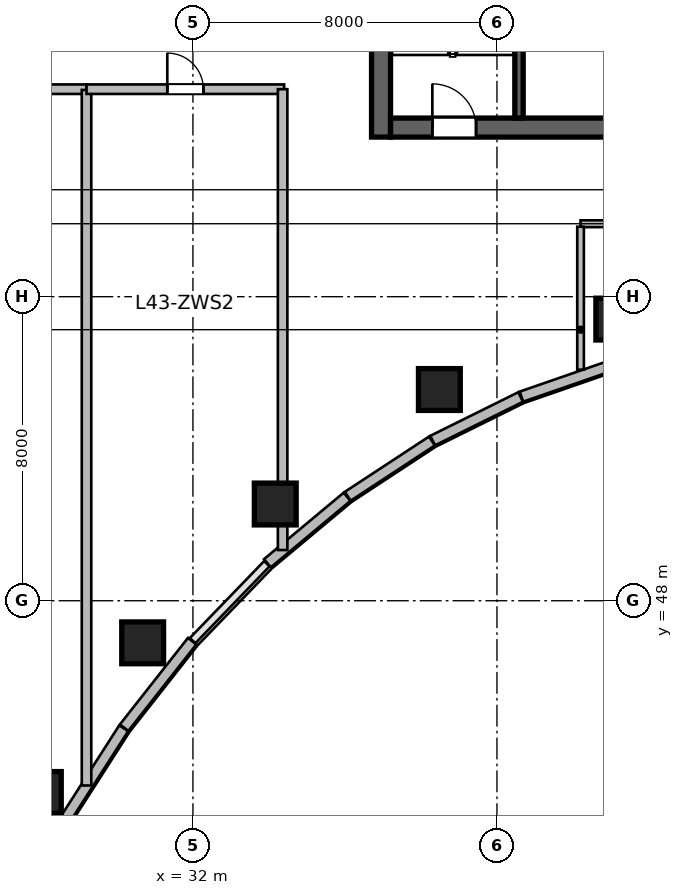
"""IFC4 building model, lengths in metres.
Left out: names, types, materials, properties, quantities, classifications, styles, units other than length and angle.
Written with IfcOpenShell. Run it as: python <this file> out.ifc"""

import sys

from ifc_helpers import new_model, si_unit, direction, frame, frame_2d, origin, origin_2d, place, context, subcontext, project, spatial, rectangle, circle, extrude, source, transform, mapped, element, fill, save


model = new_model("IFC4")
c1 = context("Model", 3, precision=1e-05, world=origin(), true_north=direction((0.0, 1.0)))
c2 = subcontext(c1, "Body", "Model", "MODEL_VIEW")
j1 = project(units=[si_unit("LENGTHUNIT", "METRE"), si_unit("PLANEANGLEUNIT", "RADIAN")], contexts=[c1])
p1 = place(None, origin())
s1 = spatial("IfcSite", under=j1, at=p1, CompositionType="ELEMENT")
p2 = place(p1, origin())
s2 = spatial("IfcBuilding", under=s1, at=p2, CompositionType="ELEMENT")
p3 = place(p2, frame((0.0, 0.0, 177.9)))
s3 = spatial("IfcBuildingStorey", under=s2, at=p3, CompositionType="ELEMENT", Elevation=177.9)
m1 = source(origin(), c2, "Body", "SweptSolid", [
    extrude(rectangle(XDim=12.0, YDim=0.5, at=frame_2d((6.0, 0.0))), origin(), (0.0, 0.0, 1.0), 3.9),
])
p4 = place(p3, frame((36.95, 60.2, 0.0), z_axis=(0.0, 0.0, 1.0), x_axis=(0.0, 1.0, 0.0)))
e1 = element("IfcWall", 1, at=p4, inside=s3, PredefinedType="SHEAR", context=c2, shape_type="MappedRepresentation", body=[
    mapped(m1, transform((0.0, 0.0, 0.0), scale=1.0)),
])
m2 = source(origin(), c2, "Body", "SweptSolid", [
    extrude(rectangle(XDim=21.6, YDim=0.5, at=frame_2d((10.8, 0.0))), origin(), (0.0, 0.0, 1.0), 3.9),
])
p5 = place(p3, frame((37.2, 60.45, 0.0), z_axis=(0.0, 0.0, 1.0), x_axis=(1.0, 0.0, 0.0)))
e2 = element("IfcWall", 2, at=p5, inside=s3, PredefinedType="SHEAR", context=c2, shape_type="MappedRepresentation", body=[
    mapped(m2, transform((0.0, 0.0, 0.0), scale=1.0)),
])
p6 = place(p5, frame((1.1, 0.0, 0.0)))
e3 = element("IfcOpeningElement", 3, at=p6, cuts=e2, PredefinedType="OPENING", context=c2, shape_type="SweptSolid", body=[
    extrude(rectangle(XDim=1.15, YDim=2.15, at=frame_2d((0.575, 1.075))), frame((0.0, 0.26, 0.0), z_axis=(0.0, -1.0, 0.0), x_axis=(1.0, 0.0, 0.0)), (0.0, 0.0, 1.0), 0.52),
])
p7 = place(p5, frame((19.5, 0.0, 0.0)))
e4 = element("IfcOpeningElement", 4, at=p7, cuts=e2, PredefinedType="OPENING", context=c2, shape_type="SweptSolid", body=[
    extrude(rectangle(XDim=0.9, YDim=2.1, at=frame_2d((0.45, 1.05))), frame((0.0, 0.26, 0.0), z_axis=(0.0, -1.0, 0.0), x_axis=(1.0, 0.0, 0.0)), (0.0, 0.0, 1.0), 0.52),
])
p8 = place(p5, frame((12.02, 0.0, 0.0)))
e5 = element("IfcOpeningElement", 5, at=p8, cuts=e2, PredefinedType="OPENING", context=c2, shape_type="SweptSolid", body=[
    extrude(rectangle(XDim=1.6, YDim=2.15, at=frame_2d((0.8, 1.075))), frame((0.0, 0.26, 0.0), z_axis=(0.0, -1.0, 0.0), x_axis=(1.0, 0.0, 0.0)), (0.0, 0.0, 1.0), 0.52),
])
m3 = source(origin(), c2, "Body", "SweptSolid", [
    extrude(rectangle(XDim=11.0, YDim=0.22, at=frame_2d((5.5, 0.0))), origin(), (0.0, 0.0, 1.0), 3.9),
])
p9 = place(p3, frame((40.58, 60.7, 0.0), z_axis=(0.0, 0.0, 1.0), x_axis=(0.0, 1.0, 0.0)))
e6 = element("IfcWall", 6, at=p9, inside=s3, PredefinedType="SHEAR", context=c2, shape_type="MappedRepresentation", body=[
    mapped(m3, transform((0.0, 0.0, 0.0), scale=1.0)),
])
m4 = source(origin(), c2, "Body", "SweptSolid", [
    extrude(circle(Radius=0.55, at=origin_2d()), origin(), (0.0, 0.0, 1.0), 3.9),
])
for number, where, z_axis, x_axis in (
    (7, (27.985, 42.955, 0.0), (0.0, 0.0, 1.0), (-0.691, 0.723, 0.0)),
    (8, (30.677, 46.892, 0.0), (0.0, 0.0, 1.0), (-0.571, 0.821, 0.0)),
    (9, (34.166, 50.545, 0.0), (0.0, 0.0, 1.0), (-0.436, 0.9, 0.0)),
    (10, (38.485, 53.558, 0.0), (0.0, 0.0, 1.0), (-0.289, 0.957, 0.0)),
    (11, (43.154, 55.411, 0.0), (0.0, 0.0, 1.0), (-0.143, 0.99, 0.0)),
):
    element("IfcColumn", number, at=place(p3, frame(where, z_axis=z_axis, x_axis=x_axis)), inside=s3, PredefinedType="COLUMN", context=c2, shape_type="MappedRepresentation", body=[
        mapped(m4, transform((0.0, 0.0, 0.0), scale=1.0)),
    ])
m5 = source(origin(), c2, "Body", "SweptSolid", [
    extrude(rectangle(XDim=2.53, YDim=0.28, at=frame_2d((1.265, 0.0))), origin(), (0.0, 0.0, 1.0), 3.65),
])
p10 = place(p3, frame((43.035, 54.198, 0.0), z_axis=(0.0, 0.0, 1.0), x_axis=(-0.944872429646, -0.327438683872, 0.0)))
e12 = element("IfcWall", 12, at=p10, inside=s3, PredefinedType="SOLIDWALL", context=c2, shape_type="MappedRepresentation", body=[
    mapped(m5, transform((0.0, 0.0, 0.0), scale=1.0)),
])
m6 = source(origin(), c2, "Body", "SweptSolid", [
    extrude(rectangle(XDim=2.584, YDim=0.28, at=frame_2d((1.292, 0.0))), origin(), (0.0, 0.0, 1.0), 3.65),
])
p11 = place(p3, frame((40.624, 53.361, 0.0), z_axis=(0.0, 0.0, 1.0), x_axis=(-0.895989792847, -0.44407464588, 0.0)))
e13 = element("IfcWall", 13, at=p11, inside=s3, PredefinedType="SOLIDWALL", context=c2, shape_type="MappedRepresentation", body=[
    mapped(m6, transform((0.0, 0.0, 0.0), scale=1.0)),
])
m7 = source(origin(), c2, "Body", "SweptSolid", [
    extrude(rectangle(XDim=2.652, YDim=0.28, at=frame_2d((1.326, 0.0))), origin(), (0.0, 0.0, 1.0), 3.65),
])
p12 = place(p3, frame((38.289, 52.202, 0.0), z_axis=(0.0, 0.0, 1.0), x_axis=(-0.836008323535, -0.54871676025, 0.0)))
e14 = element("IfcWall", 14, at=p12, inside=s3, PredefinedType="SOLIDWALL", context=c2, shape_type="MappedRepresentation", body=[
    mapped(m7, transform((0.0, 0.0, 0.0), scale=1.0)),
])
m8 = source(origin(), c2, "Body", "SweptSolid", [
    extrude(rectangle(XDim=2.729, YDim=0.28, at=frame_2d((1.365, 0.0))), origin(), (0.0, 0.0, 1.0), 3.65),
])
p13 = place(p3, frame((36.055, 50.735, 0.0), z_axis=(0.0, 0.0, 1.0), x_axis=(-0.767957284255, -0.640501061326, 0.0)))
e15 = element("IfcWall", 15, at=p13, inside=s3, PredefinedType="SOLIDWALL", context=c2, shape_type="MappedRepresentation", body=[
    mapped(m8, transform((0.0, 0.0, 0.0), scale=1.0)),
])
m9 = source(origin(), c2, "Body", "SweptSolid", [
    extrude(rectangle(XDim=2.897, YDim=0.28, at=frame_2d((1.448, 0.0))), origin(), (0.0, 0.0, 1.0), 3.65),
])
p14 = place(p3, frame((31.979, 46.936, 0.0), z_axis=(0.0, 0.0, 1.0), x_axis=(-0.618167636915, -0.786046291685, 0.0)))
e16 = element("IfcWall", 16, at=p14, inside=s3, PredefinedType="SOLIDWALL", context=c2, shape_type="MappedRepresentation", body=[
    mapped(m9, transform((0.0, 0.0, 0.0), scale=1.0)),
])
m10 = source(origin(), c2, "Body", "SweptSolid", [
    extrude(rectangle(XDim=2.981, YDim=0.28, at=frame_2d((1.49, 0.0))), origin(), (0.0, 0.0, 1.0), 3.65),
])
p15 = place(p3, frame((30.179, 44.645, 0.0), z_axis=(0.0, 0.0, 1.0), x_axis=(-0.540194451908, -0.841540227278, 0.0)))
e17 = element("IfcWall", 17, at=p15, inside=s3, PredefinedType="SOLIDWALL", context=c2, shape_type="MappedRepresentation", body=[
    mapped(m10, transform((0.0, 0.0, 0.0), scale=1.0)),
])
m11 = source(origin(), c2, "Body", "SweptSolid", [
    extrude(rectangle(XDim=4.176, YDim=0.18, at=frame_2d((2.088, 0.0))), origin(), (0.0, 0.0, 1.0), 3.65),
])
p16 = place(p3, frame((42.2, 57.92, 0.0), z_axis=(0.0, 0.0, 1.0), x_axis=(1.0, 0.0, 0.0)))
e18 = element("IfcWall", 18, at=p16, inside=s3, PredefinedType="PLUMBINGWALL", context=c2, shape_type="MappedRepresentation", body=[
    mapped(m11, transform((0.0, 0.0, 0.0), scale=1.0)),
])
p17 = place(p16, frame((1.638, 0.0, 0.0)))
e19 = element("IfcOpeningElement", 19, at=p17, cuts=e18, PredefinedType="OPENING", context=c2, shape_type="SweptSolid", body=[
    extrude(rectangle(XDim=0.9, YDim=2.08, at=frame_2d((0.45, 1.04))), frame((0.0, 0.1, 0.0), z_axis=(0.0, -1.0, 0.0), x_axis=(1.0, 0.0, 0.0)), (0.0, 0.0, 1.0), 0.2),
])
m12 = source(origin(), c2, "Body", "SweptSolid", [
    extrude(rectangle(XDim=3.763, YDim=0.175, at=frame_2d((1.881, 0.0))), origin(), (0.0, 0.0, 1.0), 3.65),
])
p18 = place(p3, frame((42.2, 54.079, 0.0), z_axis=(0.0, 0.0, 1.0), x_axis=(0.0, 1.0, 0.0)))
e20 = element("IfcWall", 20, at=p18, inside=s3, PredefinedType="PARTITIONING", context=c2, shape_type="MappedRepresentation", body=[
    mapped(m12, transform((0.0, 0.0, 0.0), scale=1.0)),
])
m13 = source(origin(), c2, "Body", "SweptSolid", [
    extrude(rectangle(XDim=6.02, YDim=0.25, at=frame_2d((3.01, 0.0))), origin(), (0.0, 0.0, 1.0), 3.65),
])
p19 = place(p3, frame((23.18, 61.46, 0.0), z_axis=(0.0, 0.0, 1.0), x_axis=(1.0, 0.0, 0.0)))
e21 = element("IfcWall", 21, at=p19, inside=s3, PredefinedType="PARTITIONING", context=c2, shape_type="MappedRepresentation", body=[
    mapped(m13, transform((0.0, 0.0, 0.0), scale=1.0)),
])
p20 = place(p19, frame((2.535, 0.0, 0.0)))
e22 = element("IfcOpeningElement", 22, at=p20, cuts=e21, PredefinedType="OPENING", context=c2, shape_type="SweptSolid", body=[
    extrude(rectangle(XDim=0.95, YDim=2.1, at=frame_2d((0.475, 1.05))), frame((0.0, 0.135, 0.0), z_axis=(0.0, -1.0, 0.0), x_axis=(1.0, 0.0, 0.0)), (0.0, 0.0, 1.0), 0.27),
])
m14 = source(origin(), c2, "Body", "SweptSolid", [
    extrude(rectangle(XDim=18.301, YDim=0.25, at=frame_2d((9.15, 0.0))), origin(), (0.0, 0.0, 1.0), 2.942),
])
p21 = place(p3, frame((29.2, 43.139, 0.0), z_axis=(0.0, 0.0, 1.0), x_axis=(0.0, 1.0, 0.0)))
e23 = element("IfcWall", 23, at=p21, inside=s3, PredefinedType="PARTITIONING", context=c2, shape_type="MappedRepresentation", body=[
    mapped(m14, transform((0.0, 0.0, 0.0), scale=1.0)),
])
m15 = source(origin(), c2, "Body", "SweptSolid", [
    extrude(rectangle(XDim=5.2, YDim=0.25, at=frame_2d((2.6, 0.0))), origin(), (0.0, 0.0, 1.0), 3.65),
])
p22 = place(p3, frame((29.2, 61.46, 0.0), z_axis=(0.0, 0.0, 1.0), x_axis=(1.0, 0.0, 0.0)))
e24 = element("IfcWall", 24, at=p22, inside=s3, PredefinedType="PARTITIONING", context=c2, shape_type="MappedRepresentation", body=[
    mapped(m15, transform((0.0, 0.0, 0.0), scale=1.0)),
])
p23 = place(p22, frame((2.125, 0.0, 0.0)))
e25 = element("IfcOpeningElement", 25, at=p23, cuts=e24, PredefinedType="OPENING", context=c2, shape_type="SweptSolid", body=[
    extrude(rectangle(XDim=0.95, YDim=2.1, at=frame_2d((0.475, 1.05))), frame((0.0, 0.135, 0.0), z_axis=(0.0, -1.0, 0.0), x_axis=(1.0, 0.0, 0.0)), (0.0, 0.0, 1.0), 0.27),
])
m16 = source(origin(), c2, "Body", "SweptSolid", [
    extrude(rectangle(XDim=12.126, YDim=0.25, at=frame_2d((6.063, 0.0))), origin(), (0.0, 0.0, 1.0), 3.65),
])
p24 = place(p3, frame((34.36, 49.334, 0.0), z_axis=(0.0, 0.0, 1.0), x_axis=(0.0, 1.0, 0.0)))
e26 = element("IfcWall", 26, at=p24, inside=s3, PredefinedType="PARTITIONING", context=c2, shape_type="MappedRepresentation", body=[
    mapped(m16, transform((0.0, 0.0, 0.0), scale=1.0)),
])
m17 = source(origin(), c2, "Body", "SweptSolid", [
    extrude(rectangle(XDim=1.15, YDim=2.15, at=frame_2d((0.575, 1.075))), frame((0.0, 0.025, 0.0), z_axis=(0.0, -1.0, 0.0), x_axis=(1.0, 0.0, 0.0)), (0.0, 0.0, 1.0), 0.05),
])
p25 = place(p6, origin())
e27 = element("IfcDoor", 27, at=p25, inside=s3, OperationType="SINGLE_SWING_LEFT", PredefinedType="DOOR", context=c2, shape_type="MappedRepresentation", body=[
    mapped(m17, transform((0.0, 0.0, 0.0), scale=1.0)),
])
fill(e3, e27)
m18 = source(origin(), c2, "Body", "SweptSolid", [
    extrude(rectangle(XDim=0.95, YDim=2.1, at=frame_2d((0.475, 1.05))), frame((0.0, 0.025, 0.0), z_axis=(0.0, -1.0, 0.0), x_axis=(1.0, 0.0, 0.0)), (0.0, 0.0, 1.0), 0.05),
])
p26 = place(p23, origin())
e28 = element("IfcDoor", 28, at=p26, inside=s3, OperationType="SINGLE_SWING_LEFT", PredefinedType="DOOR", context=c2, shape_type="MappedRepresentation", body=[
    mapped(m18, transform((0.0, 0.0, 0.0), scale=1.0)),
])
fill(e25, e28)
save(model, sys.argv[1])
